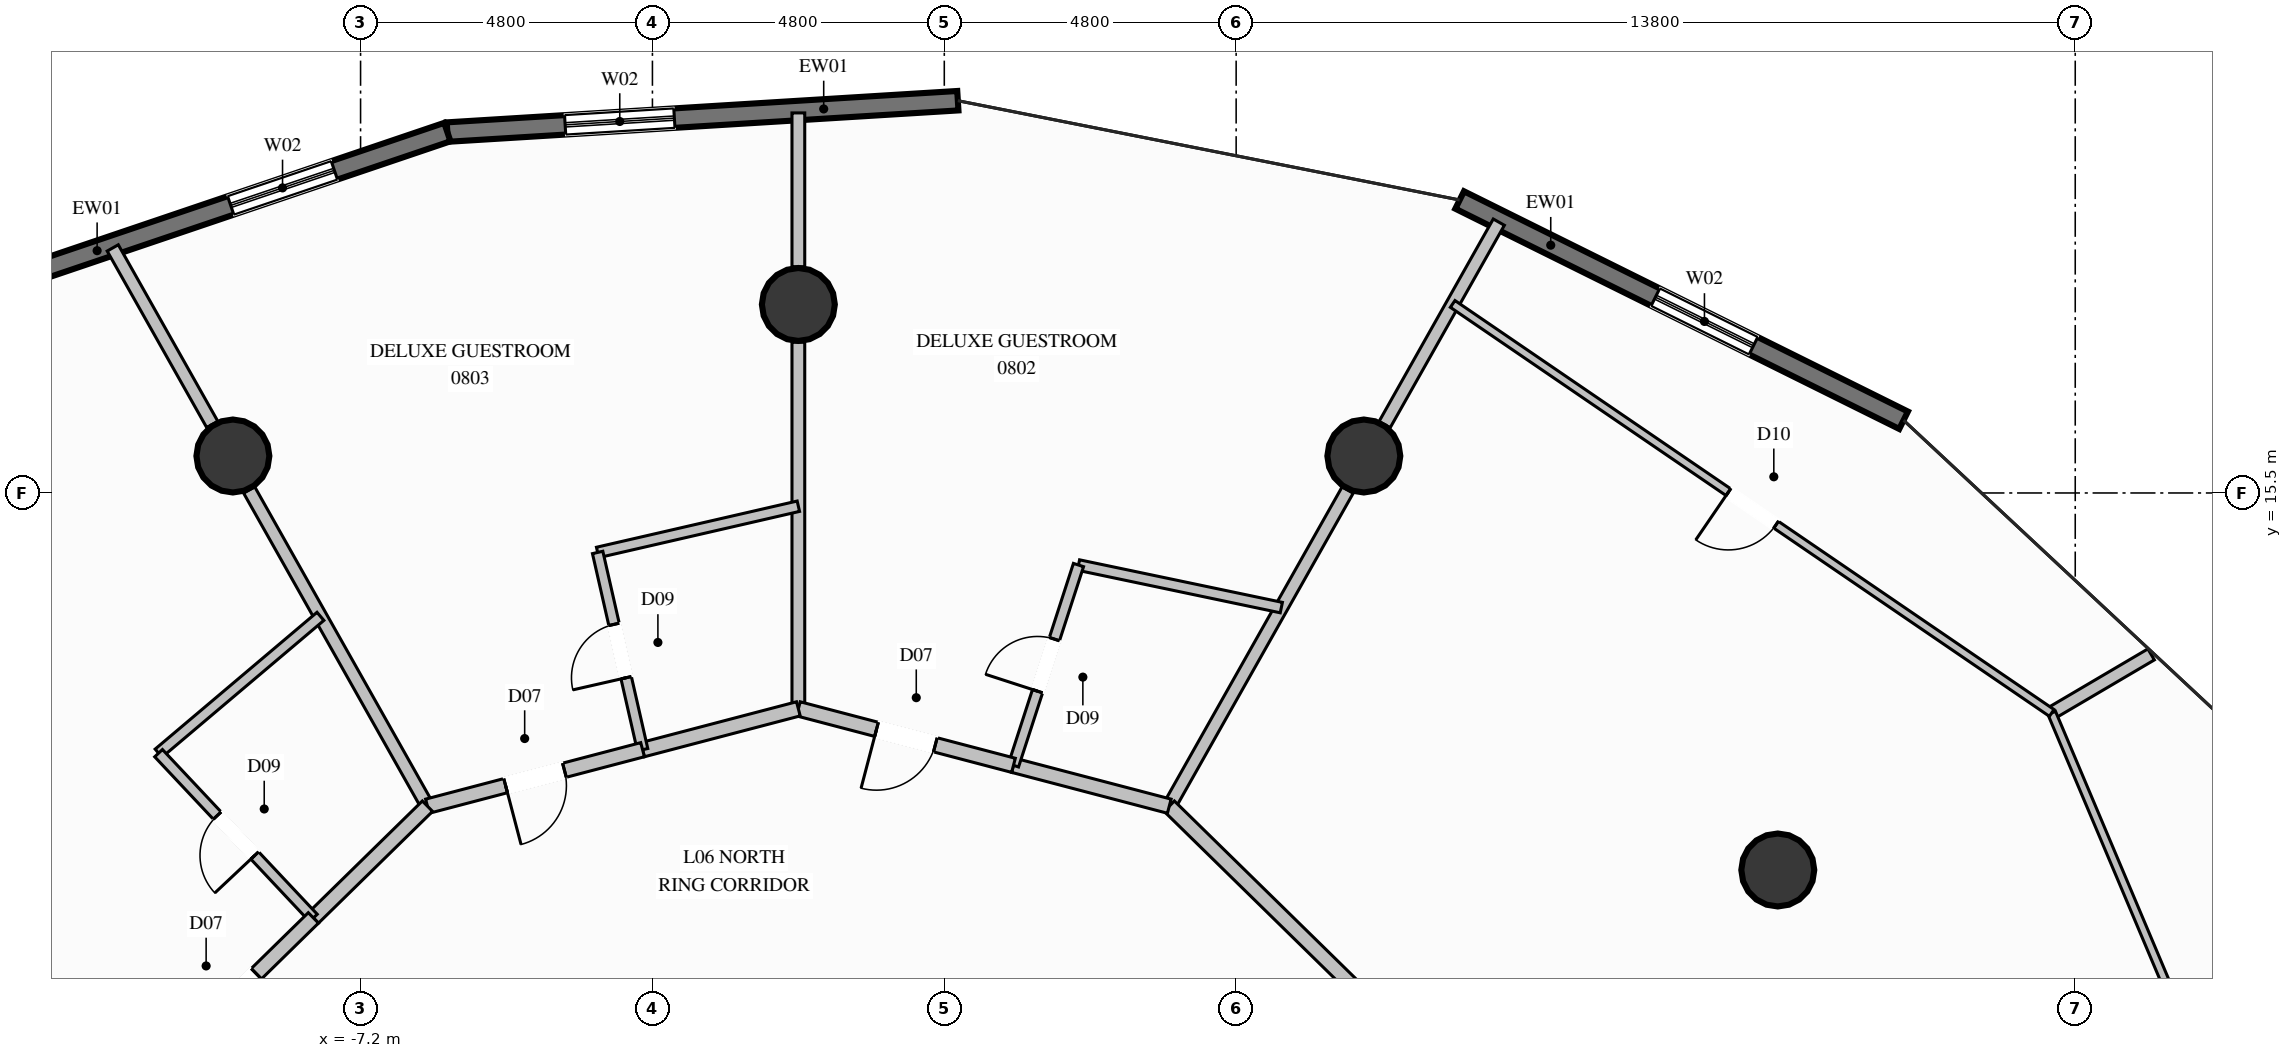
"""IFC4 building model, lengths in metres.
Left out: names, types, materials, properties, quantities, classifications, styles, units other than length and angle.
Written with IfcOpenShell. Run it as: python <this file> out.ifc"""

import sys

from ifc_helpers import new_model, si_unit, direction, frame, frame_2d, origin, origin_2d, place, context, subcontext, project, spatial, rectangle, circle, extrude, element, fill, save


model = new_model("IFC4")
c1 = context("Model", 3, precision=1e-05, world=origin(), true_north=direction((0.0, 1.0)))
c2 = subcontext(c1, "Body", "Model", "MODEL_VIEW")
j1 = project(units=[si_unit("LENGTHUNIT", "METRE"), si_unit("PLANEANGLEUNIT", "RADIAN")], contexts=[c1])
p1 = place(None, origin())
s1 = spatial("IfcSite", under=j1, at=p1, CompositionType="ELEMENT")
p2 = place(p1, origin())
s2 = spatial("IfcBuilding", under=s1, at=p2, CompositionType="ELEMENT")
p3 = place(p2, frame((0.0, 0.0, 32.0)))
s3 = spatial("IfcBuildingStorey", under=s2, at=p3, CompositionType="ELEMENT", Elevation=32.0)
for number, where, z_axis, x_axis in (
    (1, (16.108, 9.3, 0.0), (0.0, 0.0, 1.0), (1.0, 0.0, 0.0)),
    (2, (9.3, 16.108, 0.0), (0.0, 0.0, 1.0), (1.0, 0.0, 0.0)),
    (3, (0.0, 18.6, 0.0), (0.0, 0.0, 1.0), (1.0, 0.0, 0.0)),
    (4, (-9.3, 16.108, 0.0), (0.0, 0.0, 1.0), (1.0, 0.0, 0.0)),
):
    element("IfcColumn", number, at=place(p3, frame(where, z_axis=z_axis, x_axis=x_axis)), inside=s3, PredefinedType="COLUMN", context=c2, shape_type="SweptSolid", body=[
        extrude(circle(Radius=0.6, at=origin_2d()), origin(), (0.0, 0.0, 1.0), 3.6),
    ])
p4 = place(p3, frame((10.876, 20.318, 0.0), z_axis=(0.0, 0.0, 1.0), x_axis=(0.895818759339, -0.444419565743, 0.0)))
e5 = element("IfcWall", 5, at=p4, inside=s3, PredefinedType="SOLIDWALL", context=c2, shape_type="SweptSolid", body=[
    extrude(rectangle(XDim=8.15, YDim=0.32, at=frame_2d((4.075, 0.0))), origin(), (0.0, 0.0, 1.0), 3.34),
])
p5 = place(p4, frame((3.594, 0.0, 0.35)))
e6 = element("IfcOpeningElement", 6, at=p5, cuts=e5, PredefinedType="OPENING", context=c2, shape_type="SweptSolid", body=[
    extrude(rectangle(XDim=1.8, YDim=2.6, at=frame_2d((0.9, 1.3))), frame((0.0, 0.17, 0.0), z_axis=(0.0, -1.0, 0.0), x_axis=(1.0, 0.0, 0.0)), (0.0, 0.0, 1.0), 0.34),
])
p6 = place(p3, frame((-5.773, 21.435, 0.0), z_axis=(0.0, 0.0, 1.0), x_axis=(0.998117750792, 0.06132663005, 0.0)))
e7 = element("IfcWall", 7, at=p6, inside=s3, PredefinedType="SOLIDWALL", context=c2, shape_type="SweptSolid", body=[
    extrude(rectangle(XDim=8.412, YDim=0.32, at=frame_2d((4.206, 0.0))), origin(), (0.0, 0.0, 1.0), 3.34),
])
p7 = place(p6, frame((1.941, 0.0, 0.35)))
e8 = element("IfcOpeningElement", 8, at=p7, cuts=e7, PredefinedType="OPENING", context=c2, shape_type="SweptSolid", body=[
    extrude(rectangle(XDim=1.8, YDim=2.6, at=frame_2d((0.9, 1.3))), frame((0.0, 0.17, 0.0), z_axis=(0.0, -1.0, 0.0), x_axis=(1.0, 0.0, 0.0)), (0.0, 0.0, 1.0), 0.34),
])
p8 = place(p3, frame((-13.493, 18.821, 0.0), z_axis=(0.0, 0.0, 1.0), x_axis=(0.94717495877, 0.320717317085, 0.0)))
e9 = element("IfcWall", 9, at=p8, inside=s3, PredefinedType="SOLIDWALL", context=c2, shape_type="SweptSolid", body=[
    extrude(rectangle(XDim=8.151, YDim=0.32, at=frame_2d((4.075, 0.0))), origin(), (0.0, 0.0, 1.0), 3.34),
])
p9 = place(p8, frame((4.389, 0.0, 0.35)))
e10 = element("IfcOpeningElement", 10, at=p9, cuts=e9, PredefinedType="OPENING", context=c2, shape_type="SweptSolid", body=[
    extrude(rectangle(XDim=1.8, YDim=2.6, at=frame_2d((0.9, 1.3))), frame((0.0, 0.17, 0.0), z_axis=(0.0, -1.0, 0.0), x_axis=(1.0, 0.0, 0.0)), (0.0, 0.0, 1.0), 0.34),
])
p10 = place(p3, frame((6.1, 10.349, 0.0), z_axis=(0.0, 0.0, 1.0), x_axis=(0.491458802648, 0.870900824032, 0.0)))
e11 = element("IfcWall", 11, at=p10, inside=s3, PredefinedType="PARTITIONING", context=c2, shape_type="SweptSolid", body=[
    extrude(rectangle(XDim=5.97, YDim=0.21, at=frame_2d((2.985, 0.0))), origin(), (0.0, 0.0, 1.0), 2.709),
])
p11 = place(p3, frame((9.642, 16.625, 0.0), z_axis=(0.0, 0.0, 1.0), x_axis=(0.491316217202, 0.870981271161, 0.0)))
e12 = element("IfcWall", 12, at=p11, inside=s3, PredefinedType="PARTITIONING", context=c2, shape_type="SweptSolid", body=[
    extrude(rectangle(XDim=3.822, YDim=0.21, at=frame_2d((1.911, 0.0))), origin(), (0.0, 0.0, 1.0), 3.34),
])
p12 = place(p3, frame((0.0, 11.95, 0.0), z_axis=(0.0, 0.0, 1.0), x_axis=(0.0, 1.0, 0.0)))
e13 = element("IfcWall", 13, at=p12, inside=s3, PredefinedType="PARTITIONING", context=c2, shape_type="SweptSolid", body=[
    extrude(rectangle(XDim=6.03, YDim=0.21, at=frame_2d((3.015, 0.0))), origin(), (0.0, 0.0, 1.0), 2.709),
])
p13 = place(p3, frame((0.0, 19.22, 0.0), z_axis=(0.0, 0.0, 1.0), x_axis=(0.0, 1.0, 0.0)))
e14 = element("IfcWall", 14, at=p13, inside=s3, PredefinedType="PARTITIONING", context=c2, shape_type="SweptSolid", body=[
    extrude(rectangle(XDim=2.53, YDim=0.21, at=frame_2d((1.265, 0.0))), origin(), (0.0, 0.0, 1.0), 3.34),
])
p14 = place(p3, frame((-6.1, 10.349, 0.0), z_axis=(0.0, 0.0, 1.0), x_axis=(-0.491140594116, 0.871080315936, 0.0)))
e15 = element("IfcWall", 15, at=p14, inside=s3, PredefinedType="PARTITIONING", context=c2, shape_type="SweptSolid", body=[
    extrude(rectangle(XDim=5.969, YDim=0.21, at=frame_2d((2.985, 0.0))), origin(), (0.0, 0.0, 1.0), 2.709),
])
p15 = place(p3, frame((-9.639, 16.627, 0.0), z_axis=(0.0, 0.0, 1.0), x_axis=(-0.491168715891, 0.871064459457, 0.0)))
e16 = element("IfcWall", 16, at=p15, inside=s3, PredefinedType="PARTITIONING", context=c2, shape_type="SweptSolid", body=[
    extrude(rectangle(XDim=3.333, YDim=0.21, at=frame_2d((1.667, 0.0))), origin(), (0.0, 0.0, 1.0), 3.34),
])
p16 = place(p3, frame((-10.566, 5.975, 0.0), z_axis=(0.0, 0.0, 1.0), x_axis=(-0.86160761681, 0.507574935014, 0.0)))
e17 = element("IfcWall", 17, at=p16, inside=s3, PredefinedType="PARTITIONING", context=c2, shape_type="SweptSolid", body=[
    extrude(rectangle(XDim=5.845, YDim=0.21, at=frame_2d((2.922, 0.0))), origin(), (0.0, 0.0, 1.0), 2.709),
])
p17 = place(p3, frame((20.613, 11.883, 0.0), z_axis=(0.0, 0.0, 1.0), x_axis=(0.861901128596, 0.507076369519, 0.0)))
e18 = element("IfcWall", 18, at=p17, inside=s3, PredefinedType="PARTITIONING", context=c2, shape_type="SweptSolid", body=[
    extrude(rectangle(XDim=1.897, YDim=0.21, at=frame_2d((0.948, 0.0))), origin(), (0.0, 0.0, 1.0), 3.34),
])
p18 = place(p3, frame((10.566, 5.975, 0.0), z_axis=(0.0, 0.0, 1.0), x_axis=(-0.714411174131, 0.699726142342, 0.0)))
e19 = element("IfcWall", 19, at=p18, inside=s3, PredefinedType="PARTITIONING", context=c2, shape_type="SweptSolid", body=[
    extrude(rectangle(XDim=6.251, YDim=0.24, at=frame_2d((3.125, 0.0))), origin(), (0.0, 0.0, 1.0), 3.34),
])
p19 = place(p3, frame((25.635, 0.0, 0.0), z_axis=(0.0, 0.0, 1.0), x_axis=(-0.389280036571, 0.921119456491, 0.0)))
e20 = element("IfcWall", 20, at=p19, inside=s3, PredefinedType="PARTITIONING", context=c2, shape_type="SweptSolid", body=[
    extrude(rectangle(XDim=12.901, YDim=0.135, at=frame_2d((6.45, 0.0))), origin(), (0.0, 0.0, 1.0), 3.34),
])
p20 = place(p19, frame((5.975, 0.0, 0.0)))
e21 = element("IfcOpeningElement", 21, at=p20, cuts=e20, PredefinedType="OPENING", context=c2, shape_type="SweptSolid", body=[
    extrude(rectangle(XDim=0.95, YDim=2.1, at=frame_2d((0.475, 1.05))), frame((0.0, 0.078, 0.0), z_axis=(0.0, -1.0, 0.0), x_axis=(1.0, 0.0, 0.0)), (0.0, 0.0, 1.0), 0.155),
])
p21 = place(p3, frame((20.613, 11.883, 0.0), z_axis=(0.0, 0.0, 1.0), x_axis=(-0.825894658533, 0.563824452295, 0.0)))
e22 = element("IfcWall", 22, at=p21, inside=s3, PredefinedType="PARTITIONING", context=c2, shape_type="SweptSolid", body=[
    extrude(rectangle(XDim=11.929, YDim=0.135, at=frame_2d((5.964, 0.0))), origin(), (0.0, 0.0, 1.0), 3.34),
])
p22 = place(p21, frame((5.489, 0.0, 0.0)))
e23 = element("IfcOpeningElement", 23, at=p22, cuts=e22, PredefinedType="OPENING", context=c2, shape_type="SweptSolid", body=[
    extrude(rectangle(XDim=0.95, YDim=2.1, at=frame_2d((0.475, 1.05))), frame((0.0, 0.078, 0.0), z_axis=(0.0, -1.0, 0.0), x_axis=(1.0, 0.0, 0.0)), (0.0, 0.0, 1.0), 0.155),
])
p23 = place(p3, frame((6.1, 10.349, 0.0), z_axis=(0.0, 0.0, 1.0), x_axis=(-0.967291490053, 0.253667446219, 0.0)))
e24 = element("IfcWall", 24, at=p23, inside=s3, PredefinedType="PARTITIONING", context=c2, shape_type="SweptSolid", body=[
    extrude(rectangle(XDim=2.649, YDim=0.24, at=frame_2d((1.324, 0.0))), origin(), (0.0, 0.0, 1.0), 3.34),
])
p24 = place(p3, frame((7.943, 13.615, 0.0), z_axis=(0.0, 0.0, 1.0), x_axis=(-0.978691652986, 0.205335453283, 0.0)))
e25 = element("IfcWall", 25, at=p24, inside=s3, PredefinedType="PLUMBINGWALL", context=c2, shape_type="SweptSolid", body=[
    extrude(rectangle(XDim=3.409, YDim=0.175, at=frame_2d((1.705, 0.0))), origin(), (0.0, 0.0, 1.0), 3.34),
])
p25 = place(p3, frame((3.538, 11.021, 0.0), z_axis=(0.0, 0.0, 1.0), x_axis=(0.308646066056, 0.951176958251, 0.0)))
e26 = element("IfcWall", 26, at=p25, inside=s3, PredefinedType="PLUMBINGWALL", context=c2, shape_type="SweptSolid", body=[
    extrude(rectangle(XDim=3.463, YDim=0.175, at=frame_2d((1.731, 0.0))), origin(), (0.0, 0.0, 1.0), 3.34),
])
p26 = place(p25, frame((1.282, 0.0, 0.0)))
e27 = element("IfcOpeningElement", 27, at=p26, cuts=e26, PredefinedType="OPENING", context=c2, shape_type="SweptSolid", body=[
    extrude(rectangle(XDim=0.9, YDim=2.1, at=frame_2d((0.45, 1.05))), frame((0.0, 0.098, 0.0), z_axis=(0.0, -1.0, 0.0), x_axis=(1.0, 0.0, 0.0)), (0.0, 0.0, 1.0), 0.195),
])
p27 = place(p3, frame((3.538, 11.021, 0.0), z_axis=(0.0, 0.0, 1.0), x_axis=(-0.96721703222, 0.253951201187, 0.0)))
e28 = element("IfcWall", 28, at=p27, inside=s3, PredefinedType="PARTITIONING", context=c2, shape_type="SweptSolid", body=[
    extrude(rectangle(XDim=3.658, YDim=0.24, at=frame_2d((1.829, 0.0))), origin(), (0.0, 0.0, 1.0), 2.919),
])
p28 = place(p27, frame((1.329, 0.0, 0.0)))
e29 = element("IfcOpeningElement", 29, at=p28, cuts=e28, PredefinedType="OPENING", context=c2, shape_type="SweptSolid", body=[
    extrude(rectangle(XDim=1.0, YDim=2.2, at=frame_2d((0.5, 1.1))), frame((0.0, 0.13, 0.0), z_axis=(0.0, -1.0, 0.0), x_axis=(1.0, 0.0, 0.0)), (0.0, 0.0, 1.0), 0.26),
])
p29 = place(p3, frame((0.0, 11.95, 0.0), z_axis=(0.0, 0.0, 1.0), x_axis=(-0.967291490053, -0.253667446219, 0.0)))
e30 = element("IfcWall", 30, at=p29, inside=s3, PredefinedType="PARTITIONING", context=c2, shape_type="SweptSolid", body=[
    extrude(rectangle(XDim=2.649, YDim=0.24, at=frame_2d((1.324, 0.0))), origin(), (0.0, 0.0, 1.0), 2.919),
])
p30 = place(p3, frame((0.0, 15.282, 0.0), z_axis=(0.0, 0.0, 1.0), x_axis=(-0.974505253862, -0.224364681257, 0.0)))
e31 = element("IfcWall", 31, at=p30, inside=s3, PredefinedType="PLUMBINGWALL", context=c2, shape_type="SweptSolid", body=[
    extrude(rectangle(XDim=3.387, YDim=0.175, at=frame_2d((1.694, 0.0))), origin(), (0.0, 0.0, 1.0), 3.34),
])
p31 = place(p3, frame((-2.562, 11.278, 0.0), z_axis=(0.0, 0.0, 1.0), x_axis=(-0.222125372562, 0.97501811207, 0.0)))
e32 = element("IfcWall", 32, at=p31, inside=s3, PredefinedType="PLUMBINGWALL", context=c2, shape_type="SweptSolid", body=[
    extrude(rectangle(XDim=3.327, YDim=0.175, at=frame_2d((1.664, 0.0))), origin(), (0.0, 0.0, 1.0), 3.34),
])
p32 = place(p31, frame((1.214, 0.0, 0.0)))
e33 = element("IfcOpeningElement", 33, at=p32, cuts=e32, PredefinedType="OPENING", context=c2, shape_type="SweptSolid", body=[
    extrude(rectangle(XDim=0.9, YDim=2.1, at=frame_2d((0.45, 1.05))), frame((0.0, 0.098, 0.0), z_axis=(0.0, -1.0, 0.0), x_axis=(1.0, 0.0, 0.0)), (0.0, 0.0, 1.0), 0.195),
])
p33 = place(p3, frame((-2.562, 11.278, 0.0), z_axis=(0.0, 0.0, 1.0), x_axis=(-0.96721703222, -0.253951201187, 0.0)))
e34 = element("IfcWall", 34, at=p33, inside=s3, PredefinedType="PARTITIONING", context=c2, shape_type="SweptSolid", body=[
    extrude(rectangle(XDim=3.658, YDim=0.24, at=frame_2d((1.829, 0.0))), origin(), (0.0, 0.0, 1.0), 2.919),
])
p34 = place(p33, frame((1.329, 0.0, 0.0)))
e35 = element("IfcOpeningElement", 35, at=p34, cuts=e34, PredefinedType="OPENING", context=c2, shape_type="SweptSolid", body=[
    extrude(rectangle(XDim=1.0, YDim=2.2, at=frame_2d((0.5, 1.1))), frame((0.0, 0.13, 0.0), z_axis=(0.0, -1.0, 0.0), x_axis=(1.0, 0.0, 0.0)), (0.0, 0.0, 1.0), 0.26),
])
p35 = place(p3, frame((-6.1, 10.349, 0.0), z_axis=(0.0, 0.0, 1.0), x_axis=(-0.714460071513, -0.69967621527, 0.0)))
e36 = element("IfcWall", 36, at=p35, inside=s3, PredefinedType="PARTITIONING", context=c2, shape_type="SweptSolid", body=[
    extrude(rectangle(XDim=2.626, YDim=0.24, at=frame_2d((1.313, 0.0))), origin(), (0.0, 0.0, 1.0), 3.34),
])
p36 = place(p3, frame((-7.86, 13.471, 0.0), z_axis=(0.0, 0.0, 1.0), x_axis=(-0.763718302061, -0.645549653471, 0.0)))
e37 = element("IfcWall", 37, at=p36, inside=s3, PredefinedType="PLUMBINGWALL", context=c2, shape_type="SweptSolid", body=[
    extrude(rectangle(XDim=3.485, YDim=0.175, at=frame_2d((1.743, 0.0))), origin(), (0.0, 0.0, 1.0), 3.34),
])
p37 = place(p3, frame((-7.976, 8.512, 0.0), z_axis=(0.0, 0.0, 1.0), x_axis=(-0.684831906404, 0.72870107724, 0.0)))
e38 = element("IfcWall", 38, at=p37, inside=s3, PredefinedType="PLUMBINGWALL", context=c2, shape_type="SweptSolid", body=[
    extrude(rectangle(XDim=3.718, YDim=0.175, at=frame_2d((1.859, 0.0))), origin(), (0.0, 0.0, 1.0), 3.34),
])
p38 = place(p37, frame((1.409, 0.0, 0.0)))
e39 = element("IfcOpeningElement", 39, at=p38, cuts=e38, PredefinedType="OPENING", context=c2, shape_type="SweptSolid", body=[
    extrude(rectangle(XDim=0.9, YDim=2.1, at=frame_2d((0.45, 1.05))), frame((0.0, 0.098, 0.0), z_axis=(0.0, -1.0, 0.0), x_axis=(1.0, 0.0, 0.0)), (0.0, 0.0, 1.0), 0.195),
])
p39 = place(p3, frame((-7.976, 8.512, 0.0), z_axis=(0.0, 0.0, 1.0), x_axis=(-0.714375756875, -0.699762301064, 0.0)))
e40 = element("IfcWall", 40, at=p39, inside=s3, PredefinedType="PARTITIONING", context=c2, shape_type="SweptSolid", body=[
    extrude(rectangle(XDim=3.625, YDim=0.24, at=frame_2d((1.812, 0.0))), origin(), (0.0, 0.0, 1.0), 3.34),
])
p40 = place(p39, frame((1.313, 0.0, 0.0)))
e41 = element("IfcOpeningElement", 41, at=p40, cuts=e40, PredefinedType="OPENING", context=c2, shape_type="SweptSolid", body=[
    extrude(rectangle(XDim=1.0, YDim=2.2, at=frame_2d((0.5, 1.1))), frame((0.0, 0.13, 0.0), z_axis=(0.0, -1.0, 0.0), x_axis=(1.0, 0.0, 0.0)), (0.0, 0.0, 1.0), 0.26),
])
p41 = place(p5, origin())
e42 = element("IfcWindow", 42, at=p41, inside=s3, PartitioningType="SINGLE_PANEL", PredefinedType="WINDOW", context=c2, shape_type="SweptSolid", body=[
    extrude(rectangle(XDim=1.8, YDim=2.6, at=frame_2d((0.9, 1.3))), frame((0.0, 0.03, 0.0), z_axis=(0.0, -1.0, 0.0), x_axis=(1.0, 0.0, 0.0)), (0.0, 0.0, 1.0), 0.06),
])
fill(e6, e42)
p42 = place(p7, origin())
e43 = element("IfcWindow", 43, at=p42, inside=s3, PartitioningType="SINGLE_PANEL", PredefinedType="WINDOW", context=c2, shape_type="SweptSolid", body=[
    extrude(rectangle(XDim=1.8, YDim=2.6, at=frame_2d((0.9, 1.3))), frame((0.0, 0.03, 0.0), z_axis=(0.0, -1.0, 0.0), x_axis=(1.0, 0.0, 0.0)), (0.0, 0.0, 1.0), 0.06),
])
fill(e8, e43)
p43 = place(p9, origin())
e44 = element("IfcWindow", 44, at=p43, inside=s3, PartitioningType="SINGLE_PANEL", PredefinedType="WINDOW", context=c2, shape_type="SweptSolid", body=[
    extrude(rectangle(XDim=1.8, YDim=2.6, at=frame_2d((0.9, 1.3))), frame((0.0, 0.03, 0.0), z_axis=(0.0, -1.0, 0.0), x_axis=(1.0, 0.0, 0.0)), (0.0, 0.0, 1.0), 0.06),
])
fill(e10, e44)
p44 = place(p22, origin())
e45 = element("IfcDoor", 45, at=p44, inside=s3, OperationType="SINGLE_SWING_RIGHT", PredefinedType="DOOR", context=c2, shape_type="SweptSolid", body=[
    extrude(rectangle(XDim=0.95, YDim=2.1, at=frame_2d((0.475, 1.05))), frame((0.0, 0.025, 0.0), z_axis=(0.0, -1.0, 0.0), x_axis=(1.0, 0.0, 0.0)), (0.0, 0.0, 1.0), 0.05),
])
fill(e23, e45)
p45 = place(p26, origin())
e46 = element("IfcDoor", 46, at=p45, inside=s3, OperationType="SINGLE_SWING_LEFT", PredefinedType="DOOR", context=c2, shape_type="SweptSolid", body=[
    extrude(rectangle(XDim=0.9, YDim=2.1, at=frame_2d((0.45, 1.05))), frame((0.0, 0.025, 0.0), z_axis=(0.0, -1.0, 0.0), x_axis=(1.0, 0.0, 0.0)), (0.0, 0.0, 1.0), 0.05),
])
fill(e27, e46)
p46 = place(p28, origin())
e47 = element("IfcDoor", 47, at=p46, inside=s3, OperationType="SINGLE_SWING_RIGHT", PredefinedType="DOOR", context=c2, shape_type="SweptSolid", body=[
    extrude(rectangle(XDim=1.0, YDim=2.2, at=frame_2d((0.5, 1.1))), frame((0.0, 0.025, 0.0), z_axis=(0.0, -1.0, 0.0), x_axis=(1.0, 0.0, 0.0)), (0.0, 0.0, 1.0), 0.05),
])
fill(e29, e47)
p47 = place(p32, origin())
e48 = element("IfcDoor", 48, at=p47, inside=s3, OperationType="SINGLE_SWING_LEFT", PredefinedType="DOOR", context=c2, shape_type="SweptSolid", body=[
    extrude(rectangle(XDim=0.9, YDim=2.1, at=frame_2d((0.45, 1.05))), frame((0.0, 0.025, 0.0), z_axis=(0.0, -1.0, 0.0), x_axis=(1.0, 0.0, 0.0)), (0.0, 0.0, 1.0), 0.05),
])
fill(e33, e48)
p48 = place(p34, origin())
e49 = element("IfcDoor", 49, at=p48, inside=s3, OperationType="SINGLE_SWING_RIGHT", PredefinedType="DOOR", context=c2, shape_type="SweptSolid", body=[
    extrude(rectangle(XDim=1.0, YDim=2.2, at=frame_2d((0.5, 1.1))), frame((0.0, 0.025, 0.0), z_axis=(0.0, -1.0, 0.0), x_axis=(1.0, 0.0, 0.0)), (0.0, 0.0, 1.0), 0.05),
])
fill(e35, e49)
p49 = place(p38, origin())
e50 = element("IfcDoor", 50, at=p49, inside=s3, OperationType="SINGLE_SWING_LEFT", PredefinedType="DOOR", context=c2, shape_type="SweptSolid", body=[
    extrude(rectangle(XDim=0.9, YDim=2.1, at=frame_2d((0.45, 1.05))), frame((0.0, 0.025, 0.0), z_axis=(0.0, -1.0, 0.0), x_axis=(1.0, 0.0, 0.0)), (0.0, 0.0, 1.0), 0.05),
])
fill(e39, e50)
p50 = place(p40, origin())
e51 = element("IfcDoor", 51, at=p50, inside=s3, OperationType="SINGLE_SWING_RIGHT", PredefinedType="DOOR", context=c2, shape_type="SweptSolid", body=[
    extrude(rectangle(XDim=1.0, YDim=2.2, at=frame_2d((0.5, 1.1))), frame((0.0, 0.025, 0.0), z_axis=(0.0, -1.0, 0.0), x_axis=(1.0, 0.0, 0.0)), (0.0, 0.0, 1.0), 0.05),
])
fill(e41, e51)
save(model, sys.argv[1])
